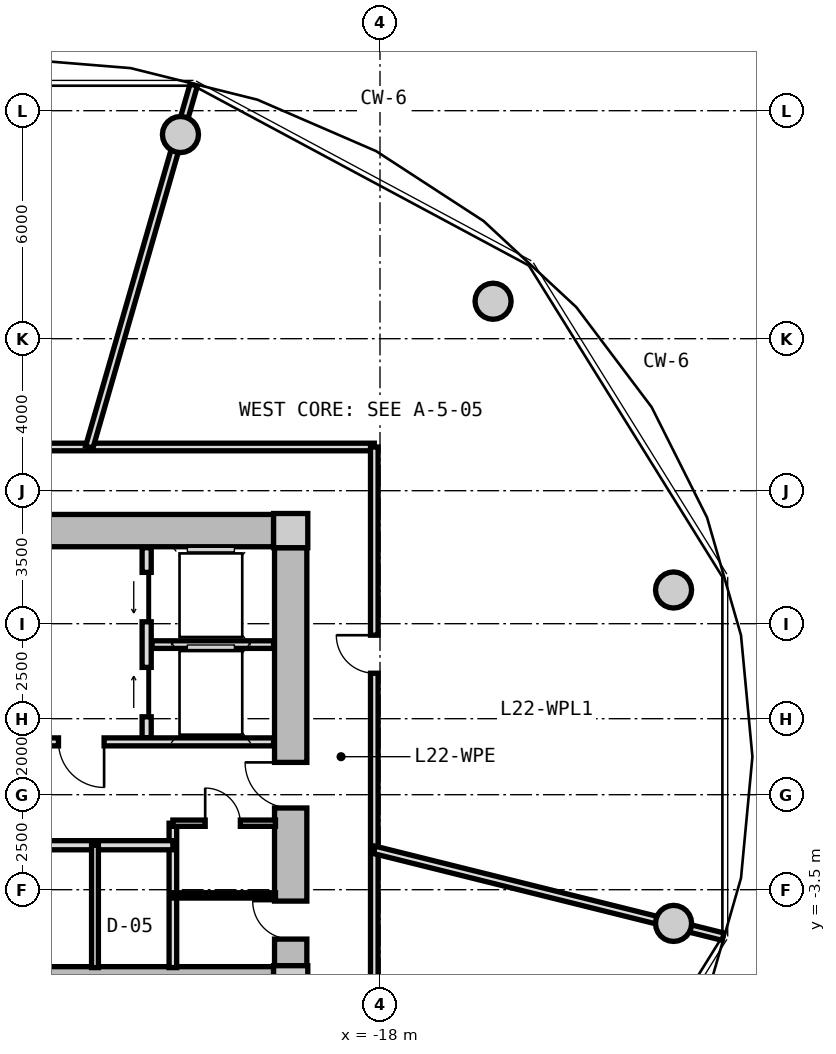
"""IFC4 building model, lengths in metres.
Left out: names, types, materials, properties, quantities, classifications, styles, units other than length and angle.
Written with IfcOpenShell. Run it as: python <this file> out.ifc"""

import sys

from ifc_helpers import new_model, si_unit, direction, frame, frame_2d, origin, origin_2d, place, context, subcontext, project, spatial, rectangle, circle, extrude, source, transform, mapped, element, fill, save


model = new_model("IFC4")
c1 = context("Model", 3, precision=1e-05, world=origin(), true_north=direction((0.0, 1.0)))
c2 = subcontext(c1, "Body", "Model", "MODEL_VIEW")
j1 = project(units=[si_unit("LENGTHUNIT", "METRE"), si_unit("PLANEANGLEUNIT", "RADIAN")], contexts=[c1])
p1 = place(None, origin())
s1 = spatial("IfcSite", under=j1, at=p1, CompositionType="ELEMENT")
p2 = place(p1, origin())
s2 = spatial("IfcBuilding", under=s1, at=p2, CompositionType="ELEMENT")
p3 = place(p2, frame((0.0, 0.0, 73.45)))
s3 = spatial("IfcBuildingStorey", under=s2, at=p3, CompositionType="ELEMENT", Elevation=73.45)
m1 = source(origin(), c2, "Body", "SweptSolid", [
    extrude(rectangle(XDim=0.9, YDim=0.9, at=origin_2d()), origin(), (0.0, 0.0, 1.0), 4.5),
])
for number, where, z_axis, x_axis in (
    (1, (-20.35, -5.95, 0.0), (0.0, 0.0, 1.0), (1.0, 0.0, 0.0)),
    (2, (-20.35, 5.95, 0.0), (0.0, 0.0, 1.0), (1.0, 0.0, 0.0)),
):
    element("IfcColumn", number, at=place(p3, frame(where, z_axis=z_axis, x_axis=x_axis)), inside=s3, PredefinedType="COLUMN", context=c2, shape_type="MappedRepresentation", body=[
        mapped(m1, transform((0.0, 0.0, 0.0), x_axis=(1.0, 0.0, 0.0), y_axis=(0.0, 1.0, 0.0), z_axis=(0.0, 0.0, 1.0), scale=1.0)),
    ])
m2 = source(origin(), c2, "Body", "SweptSolid", [
    extrude(rectangle(XDim=14.4, YDim=0.85, at=frame_2d((7.2, 0.0))), origin(), (0.0, 0.0, 1.0), 4.08),
])
for number, where, z_axis, x_axis in (
    (3, (-35.2, 5.95, 0.0), (0.0, 0.0, 1.0), (1.0, 0.0, 0.0)),
    (4, (-20.8, -5.95, 0.0), (0.0, 0.0, 1.0), (-1.0, 0.0, 0.0)),
):
    element("IfcWall", number, at=place(p3, frame(where, z_axis=z_axis, x_axis=x_axis)), inside=s3, PredefinedType="SHEAR", context=c2, shape_type="MappedRepresentation", body=[
        mapped(m2, transform((0.0, 0.0, 0.0), x_axis=(1.0, 0.0, 0.0), y_axis=(0.0, 1.0, 0.0), z_axis=(0.0, 0.0, 1.0), scale=1.0)),
    ])
m3 = source(origin(), c2, "Body", "SweptSolid", [
    extrude(rectangle(XDim=11.0, YDim=0.85, at=frame_2d((5.5, 0.0))), origin(), (0.0, 0.0, 1.0), 4.08),
])
p4 = place(p3, frame((-20.35, 5.5, 0.0), z_axis=(0.0, 0.0, 1.0), x_axis=(0.0, -1.0, 0.0)))
e5 = element("IfcWall", 5, at=p4, inside=s3, PredefinedType="SHEAR", context=c2, shape_type="MappedRepresentation", body=[
    mapped(m3, transform((0.0, 0.0, 0.0), x_axis=(1.0, 0.0, 0.0), y_axis=(0.0, 1.0, 0.0), z_axis=(0.0, 0.0, 1.0), scale=1.0)),
])
p5 = place(p4, frame((5.65, 0.0, 0.0)))
e6 = element("IfcOpeningElement", 6, at=p5, cuts=e5, PredefinedType="OPENING", context=c2, shape_type="SweptSolid", body=[
    extrude(rectangle(XDim=1.2, YDim=2.15, at=frame_2d((0.6, 1.075))), frame((0.0, 0.435, 0.0), z_axis=(0.0, -1.0, 0.0), x_axis=(1.0, 0.0, 0.0)), (0.0, 0.0, 1.0), 0.87),
])
p6 = place(p4, frame((9.3, 0.0, 0.0)))
e7 = element("IfcOpeningElement", 7, at=p6, cuts=e5, PredefinedType="OPENING", context=c2, shape_type="SweptSolid", body=[
    extrude(rectangle(XDim=1.0, YDim=2.1, at=frame_2d((0.5, 1.05))), frame((0.0, 0.435, 0.0), z_axis=(0.0, -1.0, 0.0), x_axis=(1.0, 0.0, 0.0)), (0.0, 0.0, 1.0), 0.87),
])
m4 = source(origin(), c2, "Body", "SweptSolid", [
    extrude(circle(Radius=0.475, at=origin_2d()), origin(), (0.0, 0.0, 1.0), 4.08),
])
for number, where, z_axis, x_axis in (
    (8, (-10.275, 4.387, 0.0), (0.0, 0.0, 1.0), (1.0, 0.0, 0.0)),
    (9, (-15.025, 11.985, 0.0), (0.0, 0.0, 1.0), (1.0, 0.0, 0.0)),
    (10, (-23.251, 16.373, 0.0), (0.0, 0.0, 1.0), (1.0, 0.0, 0.0)),
    (11, (-10.275, -4.387, 0.0), (0.0, 0.0, 1.0), (1.0, 0.0, 0.0)),
):
    element("IfcColumn", number, at=place(p3, frame(where, z_axis=z_axis, x_axis=x_axis)), inside=s3, PredefinedType="COLUMN", context=c2, shape_type="MappedRepresentation", body=[
        mapped(m4, transform((0.0, 0.0, 0.0), x_axis=(1.0, 0.0, 0.0), y_axis=(0.0, 1.0, 0.0), z_axis=(0.0, 0.0, 1.0), scale=1.0)),
    ])
m5 = source(origin(), c2, "Body", "SweptSolid", [
    extrude(rectangle(XDim=5.0, YDim=0.24, at=frame_2d((2.5, 0.0))), origin(), (0.0, 0.0, 1.0), 4.065),
])
p7 = place(p3, frame((-24.14, 0.5, 0.0), z_axis=(0.0, 0.0, 1.0), x_axis=(0.0, 1.0, 0.0)))
e12 = element("IfcWall", 12, at=p7, inside=s3, PredefinedType="PARTITIONING", context=c2, shape_type="MappedRepresentation", body=[
    mapped(m5, transform((0.0, 0.0, 0.0), x_axis=(1.0, 0.0, 0.0), y_axis=(0.0, 1.0, 0.0), z_axis=(0.0, 0.0, 1.0), scale=1.0)),
])
p8 = place(p7, frame((3.05, 0.0, 0.0)))
e13 = element("IfcOpeningElement", 13, at=p8, cuts=e12, PredefinedType="OPENING", context=c2, shape_type="SweptSolid", body=[
    extrude(rectangle(XDim=1.3, YDim=2.2, at=frame_2d((0.65, 1.1))), frame((0.0, 0.13, 0.0), z_axis=(0.0, -1.0, 0.0), x_axis=(1.0, 0.0, 0.0)), (0.0, 0.0, 1.0), 0.26),
])
p9 = place(p7, frame((0.55, 0.0, 0.0)))
e14 = element("IfcOpeningElement", 14, at=p9, cuts=e12, PredefinedType="OPENING", context=c2, shape_type="SweptSolid", body=[
    extrude(rectangle(XDim=1.3, YDim=2.2, at=frame_2d((0.65, 1.1))), frame((0.0, 0.13, 0.0), z_axis=(0.0, -1.0, 0.0), x_axis=(1.0, 0.0, 0.0)), (0.0, 0.0, 1.0), 0.26),
])
m6 = source(origin(), c2, "Body", "SweptSolid", [
    extrude(rectangle(XDim=3.2, YDim=0.2, at=frame_2d((1.6, 0.0))), origin(), (0.0, 0.0, 1.0), 4.065),
])
p10 = place(p3, frame((-24.0, 2.95, 0.0), z_axis=(0.0, 0.0, 1.0), x_axis=(1.0, 0.0, 0.0)))
e15 = element("IfcWall", 15, at=p10, inside=s3, PredefinedType="PARTITIONING", context=c2, shape_type="MappedRepresentation", body=[
    mapped(m6, transform((0.0, 0.0, 0.0), x_axis=(1.0, 0.0, 0.0), y_axis=(0.0, 1.0, 0.0), z_axis=(0.0, 0.0, 1.0), scale=1.0)),
])
m7 = source(origin(), c2, "Body", "SweptSolid", [
    extrude(rectangle(XDim=6.66, YDim=0.21, at=frame_2d((3.33, 0.0))), origin(), (0.0, 0.0, 1.0), 4.065),
])
p11 = place(p3, frame((-27.46, 0.39, 0.0), z_axis=(0.0, 0.0, 1.0), x_axis=(1.0, 0.0, 0.0)))
e16 = element("IfcWall", 16, at=p11, inside=s3, PredefinedType="PARTITIONING", context=c2, shape_type="MappedRepresentation", body=[
    mapped(m7, transform((0.0, 0.0, 0.0), x_axis=(1.0, 0.0, 0.0), y_axis=(0.0, 1.0, 0.0), z_axis=(0.0, 0.0, 1.0), scale=1.0)),
])
p12 = place(p11, frame((1.0, 0.0, 0.0)))
e17 = element("IfcOpeningElement", 17, at=p12, cuts=e16, PredefinedType="OPENING", context=c2, shape_type="SweptSolid", body=[
    extrude(rectangle(XDim=1.2, YDim=2.15, at=frame_2d((0.6, 1.075))), frame((0.0, 0.115, 0.0), z_axis=(0.0, -1.0, 0.0), x_axis=(1.0, 0.0, 0.0)), (0.0, 0.0, 1.0), 0.23),
])
m8 = source(origin(), c2, "Body", "SweptSolid", [
    extrude(rectangle(XDim=3.8, YDim=0.2, at=frame_2d((1.9, 0.0))), origin(), (0.0, 0.0, 1.0), 4.065),
])
p13 = place(p3, frame((-23.45, -5.55, 0.0), z_axis=(0.0, 0.0, 1.0), x_axis=(0.0, 1.0, 0.0)))
e18 = element("IfcWall", 18, at=p13, inside=s3, PredefinedType="PARTITIONING", context=c2, shape_type="MappedRepresentation", body=[
    mapped(m8, transform((0.0, 0.0, 0.0), x_axis=(1.0, 0.0, 0.0), y_axis=(0.0, 1.0, 0.0), z_axis=(0.0, 0.0, 1.0), scale=1.0)),
])
m9 = source(origin(), c2, "Body", "SweptSolid", [
    extrude(rectangle(XDim=4.13, YDim=0.24, at=frame_2d((2.065, 0.0))), origin(), (0.0, 0.0, 1.0), 4.065),
])
p14 = place(p3, frame((-27.58, -2.33, 0.0), z_axis=(0.0, 0.0, 1.0), x_axis=(1.0, 0.0, 0.0)))
e19 = element("IfcWall", 19, at=p14, inside=s3, PredefinedType="PARTITIONING", context=c2, shape_type="MappedRepresentation", body=[
    mapped(m9, transform((0.0, 0.0, 0.0), x_axis=(1.0, 0.0, 0.0), y_axis=(0.0, 1.0, 0.0), z_axis=(0.0, 0.0, 1.0), scale=1.0)),
])
m10 = source(origin(), c2, "Body", "SweptSolid", [
    extrude(rectangle(XDim=3.22, YDim=0.18, at=frame_2d((1.61, 0.0))), origin(), (0.0, 0.0, 1.0), 4.065),
])
p15 = place(p3, frame((-25.5, -5.55, 0.0), z_axis=(0.0, 0.0, 1.0), x_axis=(0.0, 1.0, 0.0)))
e20 = element("IfcWall", 20, at=p15, inside=s3, PredefinedType="PARTITIONING", context=c2, shape_type="MappedRepresentation", body=[
    mapped(m10, transform((0.0, 0.0, 0.0), x_axis=(1.0, 0.0, 0.0), y_axis=(0.0, 1.0, 0.0), z_axis=(0.0, 0.0, 1.0), scale=1.0)),
])
m11 = source(origin(), c2, "Body", "SweptSolid", [
    extrude(rectangle(XDim=2.7, YDim=0.165, at=frame_2d((1.35, 0.0))), origin(), (0.0, 0.0, 1.0), 4.065),
])
p16 = place(p3, frame((-23.45, -1.75, 0.0), z_axis=(0.0, 0.0, 1.0), x_axis=(1.0, 0.0, 0.0)))
e21 = element("IfcWall", 21, at=p16, inside=s3, PredefinedType="PARTITIONING", context=c2, shape_type="MappedRepresentation", body=[
    mapped(m11, transform((0.0, 0.0, 0.0), x_axis=(1.0, 0.0, 0.0), y_axis=(0.0, 1.0, 0.0), z_axis=(0.0, 0.0, 1.0), scale=1.0)),
])
p17 = place(p16, frame((0.85, 0.0, 0.0)))
e22 = element("IfcOpeningElement", 22, at=p17, cuts=e21, PredefinedType="OPENING", context=c2, shape_type="SweptSolid", body=[
    extrude(rectangle(XDim=0.925, YDim=2.1, at=frame_2d((0.462, 1.05))), frame((0.0, 0.093, 0.0), z_axis=(0.0, -1.0, 0.0), x_axis=(1.0, 0.0, 0.0)), (0.0, 0.0, 1.0), 0.185),
])
m12 = source(origin(), c2, "Body", "SweptSolid", [
    extrude(rectangle(XDim=2.7, YDim=0.14, at=frame_2d((1.35, 0.0))), origin(), (0.0, 0.0, 1.0), 4.065),
])
p18 = place(p3, frame((-23.45, -3.65, 0.0), z_axis=(0.0, 0.0, 1.0), x_axis=(1.0, 0.0, 0.0)))
e23 = element("IfcWall", 23, at=p18, inside=s3, PredefinedType="PARTITIONING", context=c2, shape_type="MappedRepresentation", body=[
    mapped(m12, transform((0.0, 0.0, 0.0), x_axis=(1.0, 0.0, 0.0), y_axis=(0.0, 1.0, 0.0), z_axis=(0.0, 0.0, 1.0), scale=1.0)),
])
m13 = source(origin(), c2, "Body", "SweptSolid", [
    extrude(rectangle(XDim=19.7, YDim=0.2, at=frame_2d((9.85, 0.0))), origin(), (0.0, 0.0, 1.0), 4.065),
])
p19 = place(p3, frame((-37.85, 8.15, 0.0), z_axis=(0.0, 0.0, 1.0), x_axis=(1.0, 0.0, 0.0)))
e24 = element("IfcWall", 24, at=p19, inside=s3, PredefinedType="PARTITIONING", context=c2, shape_type="MappedRepresentation", body=[
    mapped(m13, transform((0.0, 0.0, 0.0), x_axis=(1.0, 0.0, 0.0), y_axis=(0.0, 1.0, 0.0), z_axis=(0.0, 0.0, 1.0), scale=1.0)),
])
p20 = place(p19, frame((5.737, 0.0, 0.0)))
e25 = element("IfcOpeningElement", 25, at=p20, cuts=e24, PredefinedType="OPENING", context=c2, shape_type="SweptSolid", body=[
    extrude(rectangle(XDim=1.0, YDim=2.1, at=frame_2d((0.5, 1.05))), frame((0.0, 0.11, 0.0), z_axis=(0.0, -1.0, 0.0), x_axis=(1.0, 0.0, 0.0)), (0.0, 0.0, 1.0), 0.22),
])
m14 = source(origin(), c2, "Body", "SweptSolid", [
    extrude(rectangle(XDim=16.3, YDim=0.2, at=frame_2d((8.15, 0.0))), origin(), (0.0, 0.0, 1.0), 4.065),
])
p21 = place(p3, frame((-18.15, 8.15, 0.0), z_axis=(0.0, 0.0, 1.0), x_axis=(0.0, -1.0, 0.0)))
e26 = element("IfcWall", 26, at=p21, inside=s3, PredefinedType="PARTITIONING", context=c2, shape_type="MappedRepresentation", body=[
    mapped(m14, transform((0.0, 0.0, 0.0), x_axis=(1.0, 0.0, 0.0), y_axis=(0.0, 1.0, 0.0), z_axis=(0.0, 0.0, 1.0), scale=1.0)),
])
p22 = place(p21, frame((4.953, 0.0, 0.0)))
e27 = element("IfcOpeningElement", 27, at=p22, cuts=e26, PredefinedType="OPENING", context=c2, shape_type="SweptSolid", body=[
    extrude(rectangle(XDim=1.0, YDim=2.1, at=frame_2d((0.5, 1.05))), frame((0.0, 0.11, 0.0), z_axis=(0.0, -1.0, 0.0), x_axis=(1.0, 0.0, 0.0)), (0.0, 0.0, 1.0), 0.22),
])
m15 = source(origin(), c2, "Body", "SweptSolid", [
    extrude(rectangle(XDim=9.459, YDim=0.2, at=frame_2d((4.729, 0.0))), origin(), (0.0, 0.0, 1.0), 2.515),
])
p23 = place(p3, frame((-18.15, -2.452, 0.0), z_axis=(0.0, 0.0, 1.0), x_axis=(0.970390989268, -0.241539495626, 0.0)))
e28 = element("IfcWall", 28, at=p23, inside=s3, PredefinedType="PARTITIONING", context=c2, shape_type="MappedRepresentation", body=[
    mapped(m15, transform((0.0, 0.0, 0.0), x_axis=(1.0, 0.0, 0.0), y_axis=(0.0, 1.0, 0.0), z_axis=(0.0, 0.0, 1.0), scale=1.0)),
])
m16 = source(origin(), c2, "Body", "SweptSolid", [
    extrude(rectangle(XDim=9.915, YDim=0.2, at=frame_2d((4.958, 0.0))), origin(), (0.0, 0.0, 1.0), 4.065),
])
p24 = place(p3, frame((-25.649, 8.15, 0.0), z_axis=(0.0, 0.0, 1.0), x_axis=(0.277136607861, 0.960830526463, 0.0)))
e29 = element("IfcWall", 29, at=p24, inside=s3, PredefinedType="PARTITIONING", context=c2, shape_type="MappedRepresentation", body=[
    mapped(m16, transform((0.0, 0.0, 0.0), x_axis=(1.0, 0.0, 0.0), y_axis=(0.0, 1.0, 0.0), z_axis=(0.0, 0.0, 1.0), scale=1.0)),
])
m17 = source(origin(), c2, "Body", "SweptSolid", [
    extrude(rectangle(XDim=1.3, YDim=2.2, at=frame_2d((0.65, 1.1))), frame((0.0, 0.025, 0.0), z_axis=(0.0, -1.0, 0.0), x_axis=(1.0, 0.0, 0.0)), (0.0, 0.0, 1.0), 0.05),
])
p25 = place(p8, origin())
e30 = element("IfcDoor", 30, at=p25, inside=s3, OperationType="SLIDING_TO_LEFT", PredefinedType="DOOR", context=c2, shape_type="MappedRepresentation", body=[
    mapped(m17, transform((0.0, 0.0, 0.0), x_axis=(1.0, 0.0, 0.0), y_axis=(0.0, 1.0, 0.0), z_axis=(0.0, 0.0, 1.0), scale=1.0)),
])
fill(e13, e30)
p26 = place(p9, origin())
e31 = element("IfcDoor", 31, at=p26, inside=s3, OperationType="SLIDING_TO_RIGHT", PredefinedType="DOOR", context=c2, shape_type="MappedRepresentation", body=[
    mapped(m17, transform((0.0, 0.0, 0.0), x_axis=(1.0, 0.0, 0.0), y_axis=(0.0, 1.0, 0.0), z_axis=(0.0, 0.0, 1.0), scale=1.0)),
])
fill(e14, e31)
m18 = source(origin(), c2, "Body", "SweptSolid", [
    extrude(rectangle(XDim=1.2, YDim=2.15, at=frame_2d((0.6, 1.075))), frame((0.0, 0.025, 0.0), z_axis=(0.0, -1.0, 0.0), x_axis=(1.0, 0.0, 0.0)), (0.0, 0.0, 1.0), 0.05),
])
p27 = place(p12, frame((1.2, 0.0, 0.0), z_axis=(0.0, 0.0, 1.0), x_axis=(-1.0, 0.0, 0.0)))
e32 = element("IfcDoor", 32, at=p27, inside=s3, OperationType="SINGLE_SWING_LEFT", PredefinedType="DOOR", context=c2, shape_type="MappedRepresentation", body=[
    mapped(m18, transform((0.0, 0.0, 0.0), x_axis=(1.0, 0.0, 0.0), y_axis=(0.0, 1.0, 0.0), z_axis=(0.0, 0.0, 1.0), scale=1.0)),
])
fill(e17, e32)
p28 = place(p5, frame((1.2, 0.0, 0.0), z_axis=(0.0, 0.0, 1.0), x_axis=(-1.0, 0.0, 0.0)))
e33 = element("IfcDoor", 33, at=p28, inside=s3, OperationType="SINGLE_SWING_RIGHT", PredefinedType="DOOR", context=c2, shape_type="MappedRepresentation", body=[
    mapped(m18, transform((0.0, 0.0, 0.0), x_axis=(1.0, 0.0, 0.0), y_axis=(0.0, 1.0, 0.0), z_axis=(0.0, 0.0, 1.0), scale=1.0)),
])
fill(e6, e33)
m19 = source(origin(), c2, "Body", "SweptSolid", [
    extrude(rectangle(XDim=0.925, YDim=2.1, at=frame_2d((0.462, 1.05))), frame((0.0, 0.025, 0.0), z_axis=(0.0, -1.0, 0.0), x_axis=(1.0, 0.0, 0.0)), (0.0, 0.0, 1.0), 0.05),
])
p29 = place(p17, origin())
e34 = element("IfcDoor", 34, at=p29, inside=s3, OperationType="SINGLE_SWING_LEFT", PredefinedType="DOOR", context=c2, shape_type="MappedRepresentation", body=[
    mapped(m19, transform((0.0, 0.0, 0.0), x_axis=(1.0, 0.0, 0.0), y_axis=(0.0, 1.0, 0.0), z_axis=(0.0, 0.0, 1.0), scale=1.0)),
])
fill(e22, e34)
m20 = source(origin(), c2, "Body", "SweptSolid", [
    extrude(rectangle(XDim=1.0, YDim=2.1, at=frame_2d((0.5, 1.05))), frame((0.0, 0.025, 0.0), z_axis=(0.0, -1.0, 0.0), x_axis=(1.0, 0.0, 0.0)), (0.0, 0.0, 1.0), 0.05),
])
p30 = place(p6, frame((1.0, 0.0, 0.0), z_axis=(0.0, 0.0, 1.0), x_axis=(-1.0, 0.0, 0.0)))
e35 = element("IfcDoor", 35, at=p30, inside=s3, OperationType="SINGLE_SWING_RIGHT", PredefinedType="DOOR", context=c2, shape_type="MappedRepresentation", body=[
    mapped(m20, transform((0.0, 0.0, 0.0), x_axis=(1.0, 0.0, 0.0), y_axis=(0.0, 1.0, 0.0), z_axis=(0.0, 0.0, 1.0), scale=1.0)),
])
fill(e7, e35)
p31 = place(p22, frame((1.0, 0.0, 0.0), z_axis=(0.0, 0.0, 1.0), x_axis=(-1.0, 0.0, 0.0)))
e36 = element("IfcDoor", 36, at=p31, inside=s3, OperationType="SINGLE_SWING_RIGHT", PredefinedType="DOOR", context=c2, shape_type="MappedRepresentation", body=[
    mapped(m20, transform((0.0, 0.0, 0.0), x_axis=(1.0, 0.0, 0.0), y_axis=(0.0, 1.0, 0.0), z_axis=(0.0, 0.0, 1.0), scale=1.0)),
])
fill(e27, e36)
save(model, sys.argv[1])
